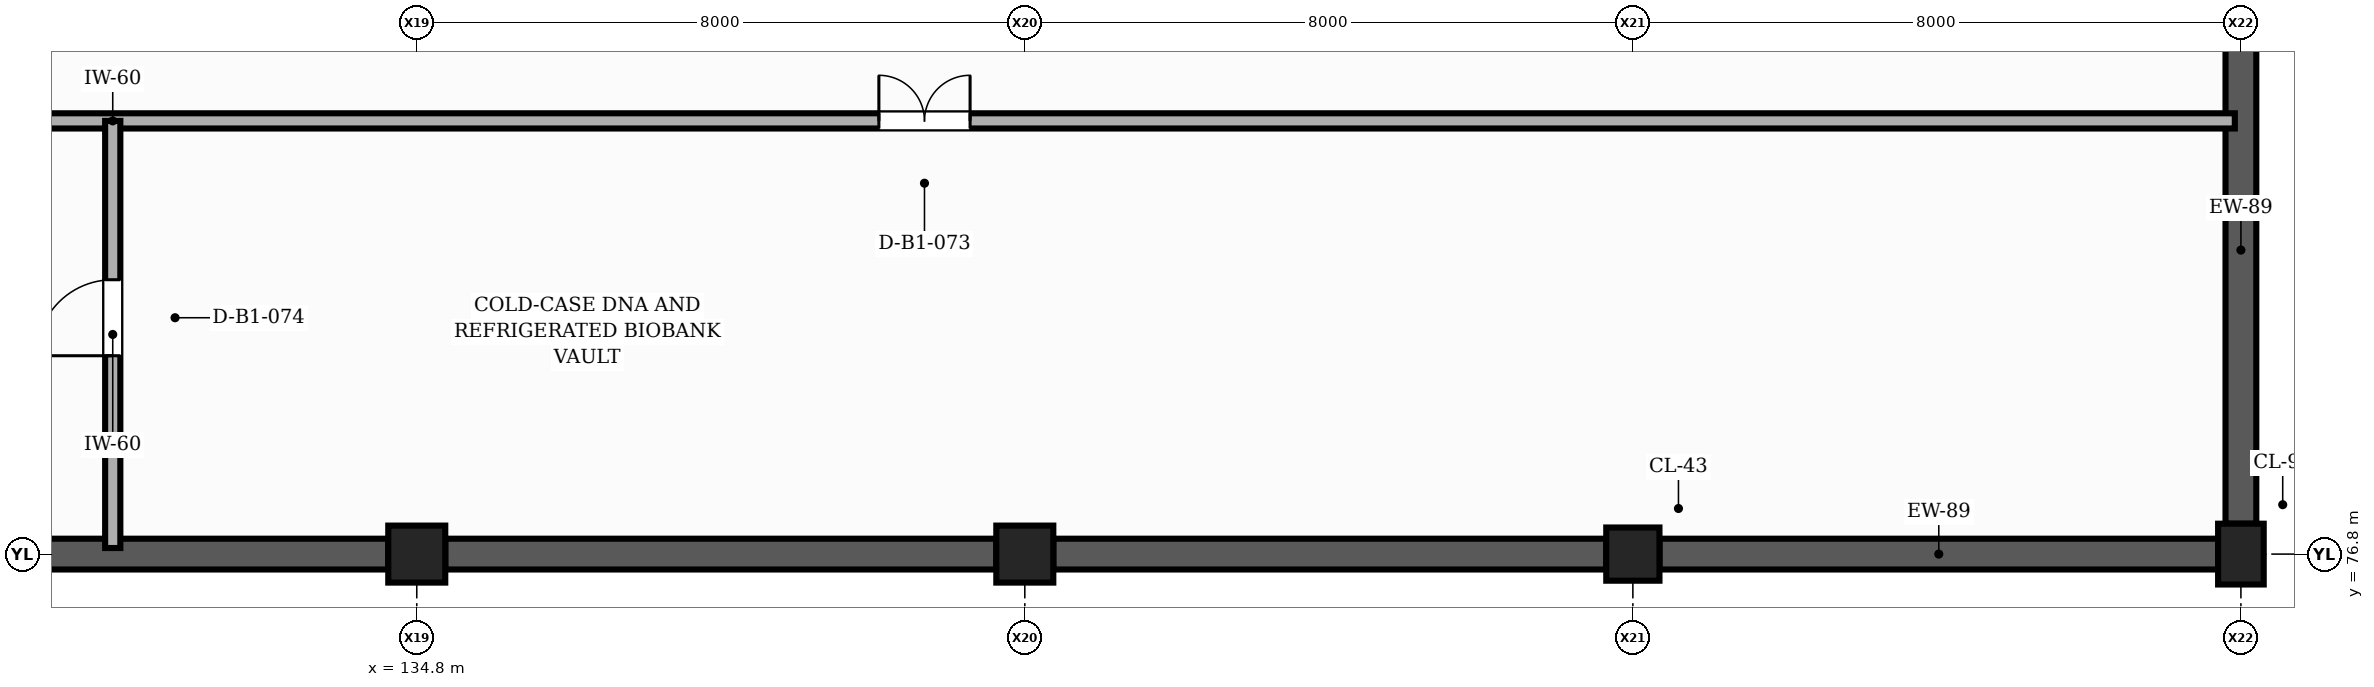
"""IFC4 building model, lengths in metres.
Left out: names, types, materials, properties, quantities, classifications, styles, units other than length and angle.
Written with IfcOpenShell. Run it as: python <this file> out.ifc"""

import sys

from ifc_helpers import new_model, si_unit, direction, frame, frame_2d, origin, origin_2d, place, context, subcontext, project, spatial, rectangle, extrude, element, fill, save


model = new_model("IFC4")
c1 = context("Model", 3, precision=1e-05, world=origin(), true_north=direction((0.0, 1.0)))
c2 = subcontext(c1, "Body", "Model", "MODEL_VIEW")
j1 = project(units=[si_unit("LENGTHUNIT", "METRE"), si_unit("PLANEANGLEUNIT", "RADIAN")], contexts=[c1])
p1 = place(None, origin())
s1 = spatial("IfcSite", under=j1, at=p1, CompositionType="ELEMENT")
p2 = place(p1, origin())
s2 = spatial("IfcBuilding", under=s1, at=p2, CompositionType="ELEMENT")
p3 = place(p2, frame((0.0, 0.0, -4.2)))
s3 = spatial("IfcBuildingStorey", under=s2, at=p3, CompositionType="ELEMENT", Elevation=-4.2)
for number, where, z_axis, x_axis in (
    (1, (134.8, 76.8, -0.52), (0.0, 0.0, 1.0), (1.0, 0.0, 0.0)),
    (2, (142.8, 76.8, -0.52), (0.0, 0.0, 1.0), (1.0, 0.0, 0.0)),
):
    element("IfcColumn", number, at=place(p3, frame(where, z_axis=z_axis, x_axis=x_axis)), inside=s3, PredefinedType="COLUMN", context=c2, shape_type="SweptSolid", body=[
        extrude(rectangle(XDim=0.75, YDim=0.75, at=origin_2d()), origin(), (0.0, 0.0, 1.0), 4.72),
    ])
p4 = place(p3, frame((150.8, 76.8, -0.52), z_axis=(0.0, 0.0, 1.0), x_axis=(1.0, 0.0, 0.0)))
e3 = element("IfcColumn", 3, at=p4, inside=s3, PredefinedType="COLUMN", context=c2, shape_type="SweptSolid", body=[
    extrude(rectangle(XDim=0.7, YDim=0.7, at=origin_2d()), origin(), (0.0, 0.0, 1.0), 4.72),
])
p5 = place(p3, frame((158.8, 76.8, -0.52), z_axis=(0.0, 0.0, 1.0), x_axis=(1.0, 0.0, 0.0)))
e4 = element("IfcColumn", 4, at=p5, inside=s3, PredefinedType="COLUMN", context=c2, shape_type="SweptSolid", body=[
    extrude(rectangle(XDim=0.6, YDim=0.8, at=origin_2d()), origin(), (0.0, 0.0, 1.0), 4.72),
])
for number, where, z_axis, x_axis in (
    (5, (127.175, 76.8, -0.44), (0.0, 0.0, 1.0), (1.0, 0.0, 0.0)),
    (6, (135.175, 76.8, -0.44), (0.0, 0.0, 1.0), (1.0, 0.0, 0.0)),
):
    element("IfcWall", number, at=place(p3, frame(where, z_axis=z_axis, x_axis=x_axis)), inside=s3, PredefinedType="SOLIDWALL", context=c2, shape_type="SweptSolid", body=[
        extrude(rectangle(XDim=7.25, YDim=0.405, at=frame_2d((3.625, 0.0))), origin(), (0.0, 0.0, 1.0), 3.47),
    ])
p6 = place(p3, frame((143.175, 76.8, -0.44), z_axis=(0.0, 0.0, 1.0), x_axis=(1.0, 0.0, 0.0)))
e7 = element("IfcWall", 7, at=p6, inside=s3, PredefinedType="SOLIDWALL", context=c2, shape_type="SweptSolid", body=[
    extrude(rectangle(XDim=7.275, YDim=0.405, at=frame_2d((3.637, 0.0))), origin(), (0.0, 0.0, 1.0), 3.47),
])
p7 = place(p3, frame((151.15, 76.8, -0.44), z_axis=(0.0, 0.0, 1.0), x_axis=(1.0, 0.0, 0.0)))
e8 = element("IfcWall", 8, at=p7, inside=s3, PredefinedType="SOLIDWALL", context=c2, shape_type="SweptSolid", body=[
    extrude(rectangle(XDim=7.35, YDim=0.405, at=frame_2d((3.675, 0.0))), origin(), (0.0, 0.0, 1.0), 3.47),
])
p8 = place(p3, frame((158.8, 77.2, -0.44), z_axis=(0.0, 0.0, 1.0), x_axis=(0.0, 1.0, 0.0)))
e9 = element("IfcWall", 9, at=p8, inside=s3, PredefinedType="SOLIDWALL", context=c2, shape_type="SweptSolid", body=[
    extrude(rectangle(XDim=7.2, YDim=0.405, at=frame_2d((3.6, 0.0))), origin(), (0.0, 0.0, 1.0), 3.57),
])
p9 = place(p3, frame((102.88, 82.5, 0.0), z_axis=(0.0, 0.0, 1.0), x_axis=(1.0, 0.0, 0.0)))
e10 = element("IfcWall", 10, at=p9, inside=s3, PredefinedType="PARTITIONING", context=c2, shape_type="SweptSolid", body=[
    extrude(rectangle(XDim=55.84, YDim=0.2, at=frame_2d((27.92, 0.0))), origin(), (0.0, 0.0, 1.0), 2.915),
])
p10 = place(p9, frame((12.0, 0.0, 0.0)))
e11 = element("IfcOpeningElement", 11, at=p10, cuts=e10, PredefinedType="OPENING", context=c2, shape_type="SweptSolid", body=[
    extrude(rectangle(XDim=1.2, YDim=2.15, at=frame_2d((0.6, 1.075))), frame((0.0, 0.11, 0.0), z_axis=(0.0, -1.0, 0.0), x_axis=(1.0, 0.0, 0.0)), (0.0, 0.0, 1.0), 0.22),
])
p11 = place(p9, frame((38.0, 0.0, 0.0)))
e12 = element("IfcOpeningElement", 12, at=p11, cuts=e10, PredefinedType="OPENING", context=c2, shape_type="SweptSolid", body=[
    extrude(rectangle(XDim=1.2, YDim=2.15, at=frame_2d((0.6, 1.075))), frame((0.0, 0.11, 0.0), z_axis=(0.0, -1.0, 0.0), x_axis=(1.0, 0.0, 0.0)), (0.0, 0.0, 1.0), 0.22),
])
p12 = place(p3, frame((130.8, 76.88, 0.0), z_axis=(0.0, 0.0, 1.0), x_axis=(0.0, 1.0, 0.0)))
e13 = element("IfcWall", 13, at=p12, inside=s3, PredefinedType="PARTITIONING", context=c2, shape_type="SweptSolid", body=[
    extrude(rectangle(XDim=5.62, YDim=0.2, at=frame_2d((2.81, 0.0))), origin(), (0.0, 0.0, 1.0), 3.015),
])
p13 = place(p12, frame((2.53, 0.0, 0.0)))
e14 = element("IfcOpeningElement", 14, at=p13, cuts=e13, PredefinedType="OPENING", context=c2, shape_type="SweptSolid", body=[
    extrude(rectangle(XDim=1.0, YDim=2.15, at=frame_2d((0.5, 1.075))), frame((0.0, 0.11, 0.0), z_axis=(0.0, -1.0, 0.0), x_axis=(1.0, 0.0, 0.0)), (0.0, 0.0, 1.0), 0.22),
])
p14 = place(p11, origin())
e15 = element("IfcDoor", 15, at=p14, inside=s3, OperationType="DOUBLE_DOOR_SINGLE_SWING", PredefinedType="DOOR", context=c2, shape_type="SweptSolid", body=[
    extrude(rectangle(XDim=1.2, YDim=2.15, at=frame_2d((0.6, 1.075))), frame((0.0, 0.025, 0.0), z_axis=(0.0, -1.0, 0.0), x_axis=(1.0, 0.0, 0.0)), (0.0, 0.0, 1.0), 0.05),
])
fill(e12, e15)
p15 = place(p13, origin())
e16 = element("IfcDoor", 16, at=p15, inside=s3, OperationType="SINGLE_SWING_LEFT", PredefinedType="DOOR", context=c2, shape_type="SweptSolid", body=[
    extrude(rectangle(XDim=1.0, YDim=2.15, at=frame_2d((0.5, 1.075))), frame((0.0, 0.025, 0.0), z_axis=(0.0, -1.0, 0.0), x_axis=(1.0, 0.0, 0.0)), (0.0, 0.0, 1.0), 0.05),
])
fill(e14, e16)
save(model, sys.argv[1])
